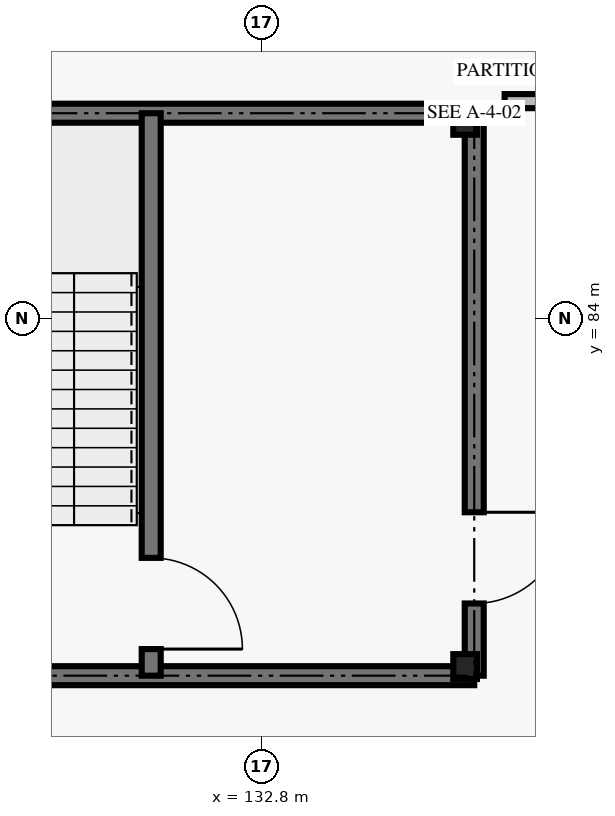
"""IFC4 building model, lengths in metres.
Left out: names, types, materials, properties, quantities, classifications, styles, units other than length and angle.
Written with IfcOpenShell. Run it as: python <this file> out.ifc"""

import sys

from ifc_helpers import new_model, si_unit, direction, frame, frame_2d, origin, origin_2d, place, context, subcontext, project, spatial, rectangle, i_section, extrude, element, fill, save


model = new_model("IFC4")
c1 = context("Model", 3, precision=1e-05, world=origin(), true_north=direction((0.0, 1.0)))
c2 = subcontext(c1, "Body", "Model", "MODEL_VIEW")
j1 = project(units=[si_unit("LENGTHUNIT", "METRE"), si_unit("PLANEANGLEUNIT", "RADIAN")], contexts=[c1])
p1 = place(None, origin())
s1 = spatial("IfcSite", under=j1, at=p1, CompositionType="ELEMENT")
p2 = place(p1, origin())
s2 = spatial("IfcBuilding", under=s1, at=p2, CompositionType="ELEMENT")
p3 = place(p2, frame((0.0, 0.0, 10.2)))
s3 = spatial("IfcBuildingStorey", under=s2, at=p3, CompositionType="ELEMENT", Elevation=10.2)
for number, where, z_axis, x_axis in (
    (1, (135.48, 79.42, 0.0), (0.0, 0.0, 1.0), (1.0, 0.0, 0.0)),
    (2, (135.48, 86.58, 0.0), (0.0, 0.0, 1.0), (1.0, 0.0, 0.0)),
):
    element("IfcColumn", number, at=place(p3, frame(where, z_axis=z_axis, x_axis=x_axis)), inside=s3, PredefinedType="COLUMN", context=c2, shape_type="SweptSolid", body=[
        extrude(i_section(OverallWidth=0.311, OverallDepth=0.327, WebThickness=0.016, FlangeThickness=0.025, FilletRadius=0.017, at=origin_2d()), origin(), (0.0, 0.0, 1.0), 4.8),
    ])
p4 = place(p3, frame((143.1, 85.2, 0.0), z_axis=(0.0, 0.0, 1.0), x_axis=(-0.539434641352, 0.842027474439, 0.0)))
e3 = element("IfcWall", 3, at=p4, inside=s3, PredefinedType="SOLIDWALL", context=c2, shape_type="SweptSolid", body=[
    extrude(rectangle(XDim=15.201, YDim=0.225, at=frame_2d((7.601, 0.0))), origin(), (0.0, 0.0, 1.0), 4.02),
])
p5 = place(p4, frame((6.676, 0.0, 0.0)))
e4 = element("IfcOpeningElement", 4, at=p5, cuts=e3, PredefinedType="OPENING", context=c2, shape_type="SweptSolid", body=[
    extrude(rectangle(XDim=1.85, YDim=2.4, at=frame_2d((0.925, 1.2))), frame((0.0, 0.123, 0.0), z_axis=(0.0, -1.0, 0.0), x_axis=(1.0, 0.0, 0.0)), (0.0, 0.0, 1.0), 0.245),
])
p6 = place(p3, frame((136.0, 86.859, 0.0), z_axis=(0.0, 0.0, 1.0), x_axis=(1.0, 0.0, 0.0)))
e5 = element("IfcWall", 5, at=p6, inside=s3, PredefinedType="PARTITIONING", context=c2, shape_type="SweptSolid", body=[
    extrude(rectangle(XDim=5.503, YDim=0.185, at=frame_2d((2.751, 0.0))), origin(), (0.0, 0.0, 1.0), 3.32),
])
p7 = place(p6, frame((2.261, 0.0, 0.0)))
e6 = element("IfcOpeningElement", 6, at=p7, cuts=e5, PredefinedType="OPENING", context=c2, shape_type="SweptSolid", body=[
    extrude(rectangle(XDim=0.98, YDim=2.15, at=frame_2d((0.49, 1.075))), frame((0.0, 0.103, 0.0), z_axis=(0.0, -1.0, 0.0), x_axis=(1.0, 0.0, 0.0)), (0.0, 0.0, 1.0), 0.205),
])
for number, where, z_axis, x_axis in (
    (7, (126.4, 86.7, 0.0), (0.0, 0.0, 1.0), (1.0, 0.0, 0.0)),
    (8, (135.6, 79.3, 0.0), (0.0, 0.0, 1.0), (-1.0, 0.0, 0.0)),
):
    element("IfcWall", number, at=place(p3, frame(where, z_axis=z_axis, x_axis=x_axis)), inside=s3, PredefinedType="SHEAR", context=c2, shape_type="SweptSolid", body=[
        extrude(rectangle(XDim=9.2, YDim=0.25, at=frame_2d((4.6, 0.0))), origin(), (0.0, 0.0, 1.0), 4.56),
    ])
p8 = place(p3, frame((135.6, 86.7, 0.0), z_axis=(0.0, 0.0, 1.0), x_axis=(0.0, -1.0, 0.0)))
e9 = element("IfcWall", 9, at=p8, inside=s3, PredefinedType="SHEAR", context=c2, shape_type="SweptSolid", body=[
    extrude(rectangle(XDim=7.4, YDim=0.25, at=frame_2d((3.7, 0.0))), origin(), (0.0, 0.0, 1.0), 4.56),
])
p9 = place(p8, frame((5.25, 0.0, 0.0)))
e10 = element("IfcOpeningElement", 10, at=p9, cuts=e9, PredefinedType="OPENING", context=c2, shape_type="SweptSolid", body=[
    extrude(rectangle(XDim=1.2, YDim=2.2, at=frame_2d((0.6, 1.1))), frame((0.0, 0.135, 0.0), z_axis=(0.0, -1.0, 0.0), x_axis=(1.0, 0.0, 0.0)), (0.0, 0.0, 1.0), 0.27),
])
p10 = place(p3, frame((131.35, 86.7, 0.0), z_axis=(0.0, 0.0, 1.0), x_axis=(0.0, -1.0, 0.0)))
e11 = element("IfcWall", 11, at=p10, inside=s3, PredefinedType="SHEAR", context=c2, shape_type="SweptSolid", body=[
    extrude(rectangle(XDim=7.4, YDim=0.25, at=frame_2d((3.7, 0.0))), origin(), (0.0, 0.0, 1.0), 4.56),
])
p11 = place(p10, frame((5.85, 0.0, 0.0)))
e12 = element("IfcOpeningElement", 12, at=p11, cuts=e11, PredefinedType="OPENING", context=c2, shape_type="SweptSolid", body=[
    extrude(rectangle(XDim=1.2, YDim=2.2, at=frame_2d((0.6, 1.1))), frame((0.0, 0.135, 0.0), z_axis=(0.0, -1.0, 0.0), x_axis=(1.0, 0.0, 0.0)), (0.0, 0.0, 1.0), 0.27),
])
p12 = place(p9, origin())
e13 = element("IfcDoor", 13, at=p12, inside=s3, OperationType="SINGLE_SWING_LEFT", PredefinedType="DOOR", context=c2, shape_type="SweptSolid", body=[
    extrude(rectangle(XDim=1.2, YDim=2.2, at=frame_2d((0.6, 1.1))), frame((0.0, 0.025, 0.0), z_axis=(0.0, -1.0, 0.0), x_axis=(1.0, 0.0, 0.0)), (0.0, 0.0, 1.0), 0.05),
])
fill(e10, e13)
p13 = place(p11, origin())
e14 = element("IfcDoor", 14, at=p13, inside=s3, OperationType="SINGLE_SWING_RIGHT", PredefinedType="DOOR", context=c2, shape_type="SweptSolid", body=[
    extrude(rectangle(XDim=1.2, YDim=2.2, at=frame_2d((0.6, 1.1))), frame((0.0, 0.025, 0.0), z_axis=(0.0, -1.0, 0.0), x_axis=(1.0, 0.0, 0.0)), (0.0, 0.0, 1.0), 0.05),
])
fill(e12, e14)
save(model, sys.argv[1])
